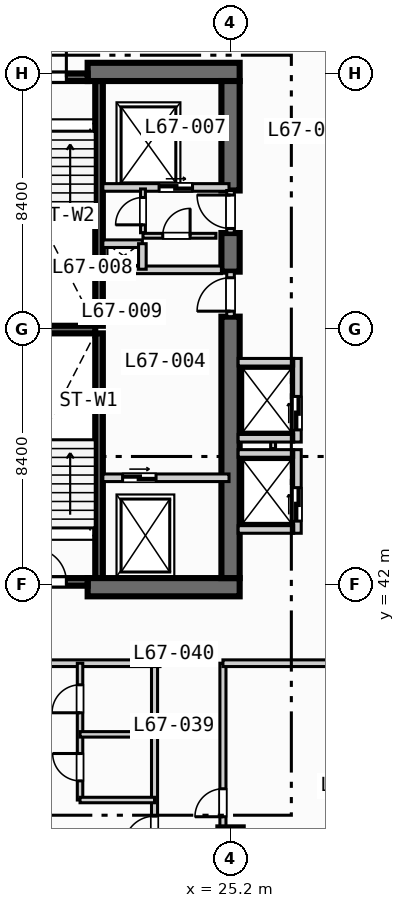
"""IFC4 building model, lengths in metres.
Left out: names, types, materials, properties, quantities, classifications, styles, units other than length and angle.
Written with IfcOpenShell. Run it as: python <this file> out.ifc"""

import sys

from ifc_helpers import new_model, si_unit, direction, frame, frame_2d, origin, origin_2d, place, context, subcontext, project, spatial, rectangle, extrude, element, fill, save


model = new_model("IFC4")
c1 = context("Model", 3, precision=1e-05, world=origin(), true_north=direction((0.0, 1.0)))
c2 = subcontext(c1, "Body", "Model", "MODEL_VIEW")
j1 = project(units=[si_unit("LENGTHUNIT", "METRE"), si_unit("PLANEANGLEUNIT", "RADIAN")], contexts=[c1])
p1 = place(None, origin())
s1 = spatial("IfcSite", under=j1, at=p1, CompositionType="ELEMENT")
p2 = place(p1, origin())
s2 = spatial("IfcBuilding", under=s1, at=p2, CompositionType="ELEMENT")
p3 = place(p2, frame((0.0, 0.0, 271.2)))
s3 = spatial("IfcBuildingStorey", under=s2, at=p3, CompositionType="ELEMENT", Elevation=271.2)
for number, where, z_axis, x_axis in (
    (1, (20.875, 42.2, 0.0), (0.0, 0.0, 1.0), (0.0, 1.0, 0.0)),
    (2, (20.875, 50.5, 0.0), (0.0, 0.0, 1.0), (0.0, 1.0, 0.0)),
):
    element("IfcWall", number, at=place(p3, frame(where, z_axis=z_axis, x_axis=x_axis)), inside=s3, PredefinedType="SOLIDWALL", context=c2, shape_type="SweptSolid", body=[
        extrude(rectangle(XDim=8.05, YDim=0.25, at=frame_2d((4.025, 0.0))), origin(), (0.0, 0.0, 1.0), 3.47),
    ])
p4 = place(p3, frame((17.25, 50.375, 0.0), z_axis=(0.0, 0.0, 1.0), x_axis=(1.0, 0.0, 0.0)))
e3 = element("IfcWall", 3, at=p4, inside=s3, PredefinedType="SOLIDWALL", context=c2, shape_type="SweptSolid", body=[
    extrude(rectangle(XDim=3.5, YDim=0.25, at=frame_2d((1.75, 0.0))), origin(), (0.0, 0.0, 1.0), 3.47),
])
for number, where, z_axis, x_axis in (
    (4, (20.5, 41.9, 0.0), (0.0, 0.0, 1.0), (1.0, 0.0, 0.0)),
    (5, (20.5, 58.85, 0.0), (0.0, 0.0, 1.0), (1.0, 0.0, 0.0)),
):
    element("IfcWall", number, at=place(p3, frame(where, z_axis=z_axis, x_axis=x_axis)), inside=s3, PredefinedType="SHEAR", context=c2, shape_type="SweptSolid", body=[
        extrude(rectangle(XDim=5.0, YDim=0.6, at=frame_2d((2.5, 0.0))), origin(), (0.0, 0.0, 1.0), 3.47),
    ])
p5 = place(p3, frame((25.2, 42.2, 0.0), z_axis=(0.0, 0.0, 1.0), x_axis=(0.0, 1.0, 0.0)))
e6 = element("IfcWall", 6, at=p5, inside=s3, PredefinedType="SHEAR", context=c2, shape_type="SweptSolid", body=[
    extrude(rectangle(XDim=8.6, YDim=0.6, at=frame_2d((4.3, 0.0))), origin(), (0.0, 0.0, 1.0), 3.47),
])
p6 = place(p3, frame((25.2, 52.28, 0.0), z_axis=(0.0, 0.0, 1.0), x_axis=(0.0, 1.0, 0.0)))
e7 = element("IfcWall", 7, at=p6, inside=s3, PredefinedType="SHEAR", context=c2, shape_type="SweptSolid", body=[
    extrude(rectangle(XDim=1.27, YDim=0.6, at=frame_2d((0.635, 0.0))), origin(), (0.0, 0.0, 1.0), 3.47),
])
p7 = place(p3, frame((25.2, 54.95, 0.0), z_axis=(0.0, 0.0, 1.0), x_axis=(0.0, 1.0, 0.0)))
e8 = element("IfcWall", 8, at=p7, inside=s3, PredefinedType="SHEAR", context=c2, shape_type="SweptSolid", body=[
    extrude(rectangle(XDim=3.6, YDim=0.6, at=frame_2d((1.8, 0.0))), origin(), (0.0, 0.0, 1.0), 3.47),
])
p8 = place(p3, frame((25.2, 33.6, 0.0), z_axis=(0.0, 0.0, 1.0), x_axis=(1.0, 0.0, 0.0)))
e9 = element("IfcColumn", 9, at=p8, inside=s3, PredefinedType="COLUMN", context=c2, shape_type="SweptSolid", body=[
    extrude(rectangle(XDim=0.8, YDim=0.8, at=origin_2d()), origin(), (0.0, 0.0, 1.0), 3.7),
])
p9 = place(p3, frame((18.0, 42.075, 0.0), z_axis=(0.0, 0.0, 1.0), x_axis=(1.0, 0.0, 0.0)))
e10 = element("IfcWall", 10, at=p9, inside=s3, PredefinedType="SOLIDWALL", context=c2, shape_type="SweptSolid", body=[
    extrude(rectangle(XDim=2.5, YDim=0.25, at=frame_2d((1.25, 0.0))), origin(), (0.0, 0.0, 1.0), 3.47),
])
p10 = place(p9, frame((0.7, 0.0, 0.0)))
e11 = element("IfcOpeningElement", 11, at=p10, cuts=e10, PredefinedType="OPENING", context=c2, shape_type="SweptSolid", body=[
    extrude(rectangle(XDim=1.1, YDim=2.15, at=frame_2d((0.55, 1.075))), frame((0.0, 0.135, 0.0), z_axis=(0.0, -1.0, 0.0), x_axis=(1.0, 0.0, 0.0)), (0.0, 0.0, 1.0), 0.27),
])
p11 = place(p3, frame((18.0, 58.675, 0.0), z_axis=(0.0, 0.0, 1.0), x_axis=(1.0, 0.0, 0.0)))
e12 = element("IfcWall", 12, at=p11, inside=s3, PredefinedType="SOLIDWALL", context=c2, shape_type="SweptSolid", body=[
    extrude(rectangle(XDim=2.5, YDim=0.25, at=frame_2d((1.25, 0.0))), origin(), (0.0, 0.0, 1.0), 3.47),
])
p12 = place(p11, frame((0.7, 0.0, 0.0)))
e13 = element("IfcOpeningElement", 13, at=p12, cuts=e12, PredefinedType="OPENING", context=c2, shape_type="SweptSolid", body=[
    extrude(rectangle(XDim=1.1, YDim=2.15, at=frame_2d((0.55, 1.075))), frame((0.0, 0.135, 0.0), z_axis=(0.0, -1.0, 0.0), x_axis=(1.0, 0.0, 0.0)), (0.0, 0.0, 1.0), 0.27),
])
p13 = place(p3, frame((21.0, 45.5, 0.0), z_axis=(0.0, 0.0, 1.0), x_axis=(1.0, 0.0, 0.0)))
e14 = element("IfcWall", 14, at=p13, inside=s3, PredefinedType="SOLIDWALL", context=c2, shape_type="SweptSolid", body=[
    extrude(rectangle(XDim=4.15, YDim=0.25, at=frame_2d((2.075, 0.0))), origin(), (0.0, 0.0, 1.0), 3.47),
])
p14 = place(p13, frame((0.65, 0.0, 0.0)))
e15 = element("IfcOpeningElement", 15, at=p14, cuts=e14, PredefinedType="OPENING", context=c2, shape_type="SweptSolid", body=[
    extrude(rectangle(XDim=1.1, YDim=2.15, at=frame_2d((0.55, 1.075))), frame((0.0, 0.135, 0.0), z_axis=(0.0, -1.0, 0.0), x_axis=(1.0, 0.0, 0.0)), (0.0, 0.0, 1.0), 0.27),
])
p15 = place(p3, frame((25.2, 50.8, 0.0), z_axis=(0.0, 0.0, 1.0), x_axis=(0.0, 1.0, 0.0)))
e16 = element("IfcWall", 16, at=p15, inside=s3, PredefinedType="SOLIDWALL", context=c2, shape_type="SweptSolid", body=[
    extrude(rectangle(XDim=1.48, YDim=0.25, at=frame_2d((0.74, 0.0))), origin(), (0.0, 0.0, 1.0), 3.47),
])
p16 = place(p15, frame((0.18, 0.0, 0.0)))
e17 = element("IfcOpeningElement", 17, at=p16, cuts=e16, PredefinedType="OPENING", context=c2, shape_type="SweptSolid", body=[
    extrude(rectangle(XDim=1.1, YDim=2.15, at=frame_2d((0.55, 1.075))), frame((0.0, 0.135, 0.0), z_axis=(0.0, -1.0, 0.0), x_axis=(1.0, 0.0, 0.0)), (0.0, 0.0, 1.0), 0.27),
])
p17 = place(p3, frame((21.0, 52.34, 0.0), z_axis=(0.0, 0.0, 1.0), x_axis=(1.0, 0.0, 0.0)))
e18 = element("IfcWall", 18, at=p17, inside=s3, PredefinedType="SOLIDWALL", context=c2, shape_type="SweptSolid", body=[
    extrude(rectangle(XDim=3.9, YDim=0.25, at=frame_2d((1.95, 0.0))), origin(), (0.0, 0.0, 1.0), 3.47),
])
p18 = place(p3, frame((21.0, 55.05, 0.0), z_axis=(0.0, 0.0, 1.0), x_axis=(1.0, 0.0, 0.0)))
e19 = element("IfcWall", 19, at=p18, inside=s3, PredefinedType="SOLIDWALL", context=c2, shape_type="SweptSolid", body=[
    extrude(rectangle(XDim=4.15, YDim=0.25, at=frame_2d((2.075, 0.0))), origin(), (0.0, 0.0, 1.0), 3.47),
])
p19 = place(p18, frame((1.85, 0.0, 0.0)))
e20 = element("IfcOpeningElement", 20, at=p19, cuts=e19, PredefinedType="OPENING", context=c2, shape_type="SweptSolid", body=[
    extrude(rectangle(XDim=1.1, YDim=2.15, at=frame_2d((0.55, 1.075))), frame((0.0, 0.135, 0.0), z_axis=(0.0, -1.0, 0.0), x_axis=(1.0, 0.0, 0.0)), (0.0, 0.0, 1.0), 0.27),
])
p20 = place(p3, frame((25.2, 53.55, 0.0), z_axis=(0.0, 0.0, 1.0), x_axis=(0.0, 1.0, 0.0)))
e21 = element("IfcWall", 21, at=p20, inside=s3, PredefinedType="SOLIDWALL", context=c2, shape_type="SweptSolid", body=[
    extrude(rectangle(XDim=1.4, YDim=0.25, at=frame_2d((0.7, 0.0))), origin(), (0.0, 0.0, 1.0), 3.47),
])
p21 = place(p20, frame((0.15, 0.0, 0.0)))
e22 = element("IfcOpeningElement", 22, at=p21, cuts=e21, PredefinedType="OPENING", context=c2, shape_type="SweptSolid", body=[
    extrude(rectangle(XDim=1.1, YDim=2.15, at=frame_2d((0.55, 1.075))), frame((0.0, 0.135, 0.0), z_axis=(0.0, -1.0, 0.0), x_axis=(1.0, 0.0, 0.0)), (0.0, 0.0, 1.0), 0.27),
])
p22 = place(p3, frame((21.0, 53.2, 0.0), z_axis=(0.0, 0.0, 1.0), x_axis=(1.0, 0.0, 0.0)))
e23 = element("IfcWall", 23, at=p22, inside=s3, PredefinedType="SOLIDWALL", context=c2, shape_type="SweptSolid", body=[
    extrude(rectangle(XDim=1.3, YDim=0.25, at=frame_2d((0.65, 0.0))), origin(), (0.0, 0.0, 1.0), 3.47),
])
p23 = place(p3, frame((22.3, 52.36, 0.0), z_axis=(0.0, 0.0, 1.0), x_axis=(0.0, 1.0, 0.0)))
e24 = element("IfcWall", 24, at=p23, inside=s3, PredefinedType="SOLIDWALL", context=c2, shape_type="SweptSolid", body=[
    extrude(rectangle(XDim=0.84, YDim=0.25, at=frame_2d((0.42, 0.0))), origin(), (0.0, 0.0, 1.0), 3.47),
])
p24 = place(p3, frame((22.32, 53.56, 0.0), z_axis=(0.0, 0.0, 1.0), x_axis=(0.0, 1.0, 0.0)))
e25 = element("IfcWall", 25, at=p24, inside=s3, PredefinedType="PARTITIONING", context=c2, shape_type="SweptSolid", body=[
    extrude(rectangle(XDim=1.44, YDim=0.16, at=frame_2d((0.72, 0.0))), origin(), (0.0, 0.0, 1.0), 3.47),
])
p25 = place(p24, frame((0.26, 0.0, 0.0)))
e26 = element("IfcOpeningElement", 26, at=p25, cuts=e25, PredefinedType="OPENING", context=c2, shape_type="SweptSolid", body=[
    extrude(rectangle(XDim=0.9, YDim=2.1, at=frame_2d((0.45, 1.05))), frame((0.0, 0.09, 0.0), z_axis=(0.0, -1.0, 0.0), x_axis=(1.0, 0.0, 0.0)), (0.0, 0.0, 1.0), 0.18),
])
p26 = place(p3, frame((22.32, 53.46, 0.0), z_axis=(0.0, 0.0, 1.0), x_axis=(1.0, 0.0, 0.0)))
e27 = element("IfcWall", 27, at=p26, inside=s3, PredefinedType="PARTITIONING", context=c2, shape_type="SweptSolid", body=[
    extrude(rectangle(XDim=2.4, YDim=0.16, at=frame_2d((1.2, 0.0))), origin(), (0.0, 0.0, 1.0), 3.47),
])
p27 = place(p26, frame((0.65, 0.0, 0.0)))
e28 = element("IfcOpeningElement", 28, at=p27, cuts=e27, PredefinedType="OPENING", context=c2, shape_type="SweptSolid", body=[
    extrude(rectangle(XDim=0.9, YDim=2.1, at=frame_2d((0.45, 1.05))), frame((0.0, 0.09, 0.0), z_axis=(0.0, -1.0, 0.0), x_axis=(1.0, 0.0, 0.0)), (0.0, 0.0, 1.0), 0.18),
])
p28 = place(p3, frame((27.4, 43.675, 0.0), z_axis=(0.0, 0.0, 1.0), x_axis=(0.0, 1.0, 0.0)))
e29 = element("IfcWall", 29, at=p28, inside=s3, PredefinedType="SOLIDWALL", context=c2, shape_type="SweptSolid", body=[
    extrude(rectangle(XDim=2.75, YDim=0.25, at=frame_2d((1.375, 0.0))), origin(), (0.0, 0.0, 1.0), 3.47),
])
p29 = place(p28, frame((0.4, 0.0, 0.0)))
e30 = element("IfcOpeningElement", 30, at=p29, cuts=e29, PredefinedType="OPENING", context=c2, shape_type="SweptSolid", body=[
    extrude(rectangle(XDim=1.1, YDim=2.15, at=frame_2d((0.55, 1.075))), frame((0.0, 0.135, 0.0), z_axis=(0.0, -1.0, 0.0), x_axis=(1.0, 0.0, 0.0)), (0.0, 0.0, 1.0), 0.27),
])
for number, where, z_axis, x_axis in (
    (31, (25.45, 43.8, 0.0), (0.0, 0.0, 1.0), (1.0, 0.0, 0.0)),
    (32, (25.45, 46.3, 0.0), (0.0, 0.0, 1.0), (1.0, 0.0, 0.0)),
):
    element("IfcWall", number, at=place(p3, frame(where, z_axis=z_axis, x_axis=x_axis)), inside=s3, PredefinedType="SOLIDWALL", context=c2, shape_type="SweptSolid", body=[
        extrude(rectangle(XDim=1.825, YDim=0.25, at=frame_2d((0.913, 0.0))), origin(), (0.0, 0.0, 1.0), 3.47),
    ])
p30 = place(p3, frame((26.6, 46.46, 0.0), z_axis=(0.0, 0.0, 1.0), x_axis=(0.0, 1.0, 0.0)))
e33 = element("IfcWall", 33, at=p30, inside=s3, PredefinedType="PARTITIONING", context=c2, shape_type="SweptSolid", body=[
    extrude(rectangle(XDim=0.88, YDim=0.16, at=frame_2d((0.44, 0.0))), origin(), (0.0, 0.0, 1.0), 3.47),
])
p31 = place(p3, frame((27.4, 46.675, 0.0), z_axis=(0.0, 0.0, 1.0), x_axis=(0.0, 1.0, 0.0)))
e34 = element("IfcWall", 34, at=p31, inside=s3, PredefinedType="SOLIDWALL", context=c2, shape_type="SweptSolid", body=[
    extrude(rectangle(XDim=2.75, YDim=0.25, at=frame_2d((1.375, 0.0))), origin(), (0.0, 0.0, 1.0), 3.47),
])
p32 = place(p31, frame((0.4, 0.0, 0.0)))
e35 = element("IfcOpeningElement", 35, at=p32, cuts=e34, PredefinedType="OPENING", context=c2, shape_type="SweptSolid", body=[
    extrude(rectangle(XDim=1.1, YDim=2.15, at=frame_2d((0.55, 1.075))), frame((0.0, 0.135, 0.0), z_axis=(0.0, -1.0, 0.0), x_axis=(1.0, 0.0, 0.0)), (0.0, 0.0, 1.0), 0.27),
])
for number, where, z_axis, x_axis in (
    (36, (25.45, 46.8, 0.0), (0.0, 0.0, 1.0), (1.0, 0.0, 0.0)),
    (37, (25.45, 49.3, 0.0), (0.0, 0.0, 1.0), (1.0, 0.0, 0.0)),
):
    element("IfcWall", number, at=place(p3, frame(where, z_axis=z_axis, x_axis=x_axis)), inside=s3, PredefinedType="SOLIDWALL", context=c2, shape_type="SweptSolid", body=[
        extrude(rectangle(XDim=1.825, YDim=0.25, at=frame_2d((0.913, 0.0))), origin(), (0.0, 0.0, 1.0), 3.47),
    ])
p33 = place(p3, frame((24.95, 30.6, 0.0), z_axis=(0.0, 0.0, 1.0), x_axis=(0.0, 1.0, 0.0)))
e38 = element("IfcWall", 38, at=p33, inside=s3, PredefinedType="PARTITIONING", context=c2, shape_type="SweptSolid", body=[
    extrude(rectangle(XDim=8.8, YDim=0.2, at=frame_2d((4.4, 0.0))), origin(), (0.0, 0.0, 1.0), 2.82),
])
p34 = place(p33, frame((3.75, 0.0, 0.0)))
e39 = element("IfcOpeningElement", 39, at=p34, cuts=e38, PredefinedType="OPENING", context=c2, shape_type="SweptSolid", body=[
    extrude(rectangle(XDim=0.92, YDim=2.1, at=frame_2d((0.46, 1.05))), frame((0.0, 0.11, 0.0), z_axis=(0.0, -1.0, 0.0), x_axis=(1.0, 0.0, 0.0)), (0.0, 0.0, 1.0), 0.22),
])
p35 = place(p3, frame((24.95, 39.4, 0.0), z_axis=(0.0, 0.0, 1.0), x_axis=(1.0, 0.0, 0.0)))
e40 = element("IfcWall", 40, at=p35, inside=s3, PredefinedType="PARTITIONING", context=c2, shape_type="SweptSolid", body=[
    extrude(rectangle(XDim=8.35, YDim=0.22, at=frame_2d((4.175, 0.0))), origin(), (0.0, 0.0, 1.0), 3.47),
])
p36 = place(p3, frame((22.7, 30.65, 0.0), z_axis=(0.0, 0.0, 1.0), x_axis=(0.0, 1.0, 0.0)))
e41 = element("IfcWall", 41, at=p36, inside=s3, PredefinedType="PARTITIONING", context=c2, shape_type="SweptSolid", body=[
    extrude(rectangle(XDim=8.75, YDim=0.2, at=frame_2d((4.375, 0.0))), origin(), (0.0, 0.0, 1.0), 3.47),
])
p37 = place(p36, frame((2.72, 0.0, 0.0)))
e42 = element("IfcOpeningElement", 42, at=p37, cuts=e41, PredefinedType="OPENING", context=c2, shape_type="SweptSolid", body=[
    extrude(rectangle(XDim=1.0, YDim=2.15, at=frame_2d((0.5, 1.075))), frame((0.0, 0.11, 0.0), z_axis=(0.0, -1.0, 0.0), x_axis=(1.0, 0.0, 0.0)), (0.0, 0.0, 1.0), 0.22),
])
p38 = place(p3, frame((8.6, 39.4, 0.0), z_axis=(0.0, 0.0, 1.0), x_axis=(1.0, 0.0, 0.0)))
e43 = element("IfcWall", 43, at=p38, inside=s3, PredefinedType="PARTITIONING", context=c2, shape_type="SweptSolid", body=[
    extrude(rectangle(XDim=14.28, YDim=0.22, at=frame_2d((7.14, 0.0))), origin(), (0.0, 0.0, 1.0), 3.47),
])
p39 = place(p3, frame((20.25, 34.9, 0.0), z_axis=(0.0, 0.0, 1.0), x_axis=(0.0, 1.0, 0.0)))
e44 = element("IfcWall", 44, at=p39, inside=s3, PredefinedType="PLUMBINGWALL", context=c2, shape_type="SweptSolid", body=[
    extrude(rectangle(XDim=4.5, YDim=0.18, at=frame_2d((2.25, 0.0))), origin(), (0.0, 0.0, 1.0), 3.47),
])
p40 = place(p39, frame((0.63, 0.0, 0.0)))
e45 = element("IfcOpeningElement", 45, at=p40, cuts=e44, PredefinedType="OPENING", context=c2, shape_type="SweptSolid", body=[
    extrude(rectangle(XDim=0.9, YDim=2.1, at=frame_2d((0.45, 1.05))), frame((0.0, 0.1, 0.0), z_axis=(0.0, -1.0, 0.0), x_axis=(1.0, 0.0, 0.0)), (0.0, 0.0, 1.0), 0.2),
])
p41 = place(p39, frame((2.87, 0.0, 0.0)))
e46 = element("IfcOpeningElement", 46, at=p41, cuts=e44, PredefinedType="OPENING", context=c2, shape_type="SweptSolid", body=[
    extrude(rectangle(XDim=0.92, YDim=2.1, at=frame_2d((0.46, 1.05))), frame((0.0, 0.1, 0.0), z_axis=(0.0, -1.0, 0.0), x_axis=(1.0, 0.0, 0.0)), (0.0, 0.0, 1.0), 0.2),
])
for number, where, z_axis, x_axis in (
    (47, (20.25, 34.9, 0.0), (0.0, 0.0, 1.0), (1.0, 0.0, 0.0)),
    (48, (20.25, 37.06, 0.0), (0.0, 0.0, 1.0), (1.0, 0.0, 0.0)),
):
    element("IfcWall", number, at=place(p3, frame(where, z_axis=z_axis, x_axis=x_axis)), inside=s3, PredefinedType="PLUMBINGWALL", context=c2, shape_type="SweptSolid", body=[
        extrude(rectangle(XDim=2.45, YDim=0.18, at=frame_2d((1.225, 0.0))), origin(), (0.0, 0.0, 1.0), 3.47),
    ])
p42 = place(p10, origin())
e49 = element("IfcDoor", 49, at=p42, inside=s3, OperationType="SINGLE_SWING_LEFT", PredefinedType="DOOR", context=c2, shape_type="SweptSolid", body=[
    extrude(rectangle(XDim=1.1, YDim=2.15, at=frame_2d((0.55, 1.075))), frame((0.0, 0.025, 0.0), z_axis=(0.0, -1.0, 0.0), x_axis=(1.0, 0.0, 0.0)), (0.0, 0.0, 1.0), 0.05),
])
fill(e11, e49)
p43 = place(p12, origin())
e50 = element("IfcDoor", 50, at=p43, inside=s3, OperationType="SINGLE_SWING_RIGHT", PredefinedType="DOOR", context=c2, shape_type="SweptSolid", body=[
    extrude(rectangle(XDim=1.1, YDim=2.15, at=frame_2d((0.55, 1.075))), frame((0.0, 0.025, 0.0), z_axis=(0.0, -1.0, 0.0), x_axis=(1.0, 0.0, 0.0)), (0.0, 0.0, 1.0), 0.05),
])
fill(e13, e50)
p44 = place(p14, origin())
e51 = element("IfcDoor", 51, at=p44, inside=s3, OperationType="SLIDING_TO_LEFT", PredefinedType="DOOR", context=c2, shape_type="SweptSolid", body=[
    extrude(rectangle(XDim=1.1, YDim=2.15, at=frame_2d((0.55, 1.075))), frame((0.0, 0.025, 0.0), z_axis=(0.0, -1.0, 0.0), x_axis=(1.0, 0.0, 0.0)), (0.0, 0.0, 1.0), 0.05),
])
fill(e15, e51)
p45 = place(p16, origin())
e52 = element("IfcDoor", 52, at=p45, inside=s3, OperationType="SINGLE_SWING_LEFT", PredefinedType="DOOR", context=c2, shape_type="SweptSolid", body=[
    extrude(rectangle(XDim=1.1, YDim=2.15, at=frame_2d((0.55, 1.075))), frame((0.0, 0.025, 0.0), z_axis=(0.0, -1.0, 0.0), x_axis=(1.0, 0.0, 0.0)), (0.0, 0.0, 1.0), 0.05),
])
fill(e17, e52)
p46 = place(p19, origin())
e53 = element("IfcDoor", 53, at=p46, inside=s3, OperationType="SLIDING_TO_LEFT", PredefinedType="DOOR", context=c2, shape_type="SweptSolid", body=[
    extrude(rectangle(XDim=1.1, YDim=2.15, at=frame_2d((0.55, 1.075))), frame((0.0, 0.025, 0.0), z_axis=(0.0, -1.0, 0.0), x_axis=(1.0, 0.0, 0.0)), (0.0, 0.0, 1.0), 0.05),
])
fill(e20, e53)
p47 = place(p21, origin())
e54 = element("IfcDoor", 54, at=p47, inside=s3, OperationType="SINGLE_SWING_RIGHT", PredefinedType="DOOR", context=c2, shape_type="SweptSolid", body=[
    extrude(rectangle(XDim=1.1, YDim=2.15, at=frame_2d((0.55, 1.075))), frame((0.0, 0.025, 0.0), z_axis=(0.0, -1.0, 0.0), x_axis=(1.0, 0.0, 0.0)), (0.0, 0.0, 1.0), 0.05),
])
fill(e22, e54)
p48 = place(p25, origin())
e55 = element("IfcDoor", 55, at=p48, inside=s3, OperationType="SINGLE_SWING_LEFT", PredefinedType="DOOR", context=c2, shape_type="SweptSolid", body=[
    extrude(rectangle(XDim=0.9, YDim=2.1, at=frame_2d((0.45, 1.05))), frame((0.0, 0.025, 0.0), z_axis=(0.0, -1.0, 0.0), x_axis=(1.0, 0.0, 0.0)), (0.0, 0.0, 1.0), 0.05),
])
fill(e26, e55)
p49 = place(p27, origin())
e56 = element("IfcDoor", 56, at=p49, inside=s3, OperationType="SINGLE_SWING_RIGHT", PredefinedType="DOOR", context=c2, shape_type="SweptSolid", body=[
    extrude(rectangle(XDim=0.9, YDim=2.1, at=frame_2d((0.45, 1.05))), frame((0.0, 0.025, 0.0), z_axis=(0.0, -1.0, 0.0), x_axis=(1.0, 0.0, 0.0)), (0.0, 0.0, 1.0), 0.05),
])
fill(e28, e56)
p50 = place(p29, origin())
e57 = element("IfcDoor", 57, at=p50, inside=s3, OperationType="SLIDING_TO_LEFT", PredefinedType="DOOR", context=c2, shape_type="SweptSolid", body=[
    extrude(rectangle(XDim=1.1, YDim=2.15, at=frame_2d((0.55, 1.075))), frame((0.0, 0.025, 0.0), z_axis=(0.0, -1.0, 0.0), x_axis=(1.0, 0.0, 0.0)), (0.0, 0.0, 1.0), 0.05),
])
fill(e30, e57)
p51 = place(p32, origin())
e58 = element("IfcDoor", 58, at=p51, inside=s3, OperationType="SLIDING_TO_LEFT", PredefinedType="DOOR", context=c2, shape_type="SweptSolid", body=[
    extrude(rectangle(XDim=1.1, YDim=2.15, at=frame_2d((0.55, 1.075))), frame((0.0, 0.025, 0.0), z_axis=(0.0, -1.0, 0.0), x_axis=(1.0, 0.0, 0.0)), (0.0, 0.0, 1.0), 0.05),
])
fill(e35, e58)
p52 = place(p34, origin())
e59 = element("IfcDoor", 59, at=p52, inside=s3, OperationType="SINGLE_SWING_LEFT", PredefinedType="DOOR", context=c2, shape_type="SweptSolid", body=[
    extrude(rectangle(XDim=0.92, YDim=2.1, at=frame_2d((0.46, 1.05))), frame((0.0, 0.025, 0.0), z_axis=(0.0, -1.0, 0.0), x_axis=(1.0, 0.0, 0.0)), (0.0, 0.0, 1.0), 0.05),
])
fill(e39, e59)
p53 = place(p37, origin())
e60 = element("IfcDoor", 60, at=p53, inside=s3, OperationType="SINGLE_SWING_LEFT", PredefinedType="DOOR", context=c2, shape_type="SweptSolid", body=[
    extrude(rectangle(XDim=1.0, YDim=2.15, at=frame_2d((0.5, 1.075))), frame((0.0, 0.025, 0.0), z_axis=(0.0, -1.0, 0.0), x_axis=(1.0, 0.0, 0.0)), (0.0, 0.0, 1.0), 0.05),
])
fill(e42, e60)
p54 = place(p40, origin())
e61 = element("IfcDoor", 61, at=p54, inside=s3, OperationType="SINGLE_SWING_RIGHT", PredefinedType="DOOR", context=c2, shape_type="SweptSolid", body=[
    extrude(rectangle(XDim=0.9, YDim=2.1, at=frame_2d((0.45, 1.05))), frame((0.0, 0.025, 0.0), z_axis=(0.0, -1.0, 0.0), x_axis=(1.0, 0.0, 0.0)), (0.0, 0.0, 1.0), 0.05),
])
fill(e45, e61)
p55 = place(p41, origin())
e62 = element("IfcDoor", 62, at=p55, inside=s3, OperationType="SINGLE_SWING_LEFT", PredefinedType="DOOR", context=c2, shape_type="SweptSolid", body=[
    extrude(rectangle(XDim=0.92, YDim=2.1, at=frame_2d((0.46, 1.05))), frame((0.0, 0.025, 0.0), z_axis=(0.0, -1.0, 0.0), x_axis=(1.0, 0.0, 0.0)), (0.0, 0.0, 1.0), 0.05),
])
fill(e46, e62)
save(model, sys.argv[1])
